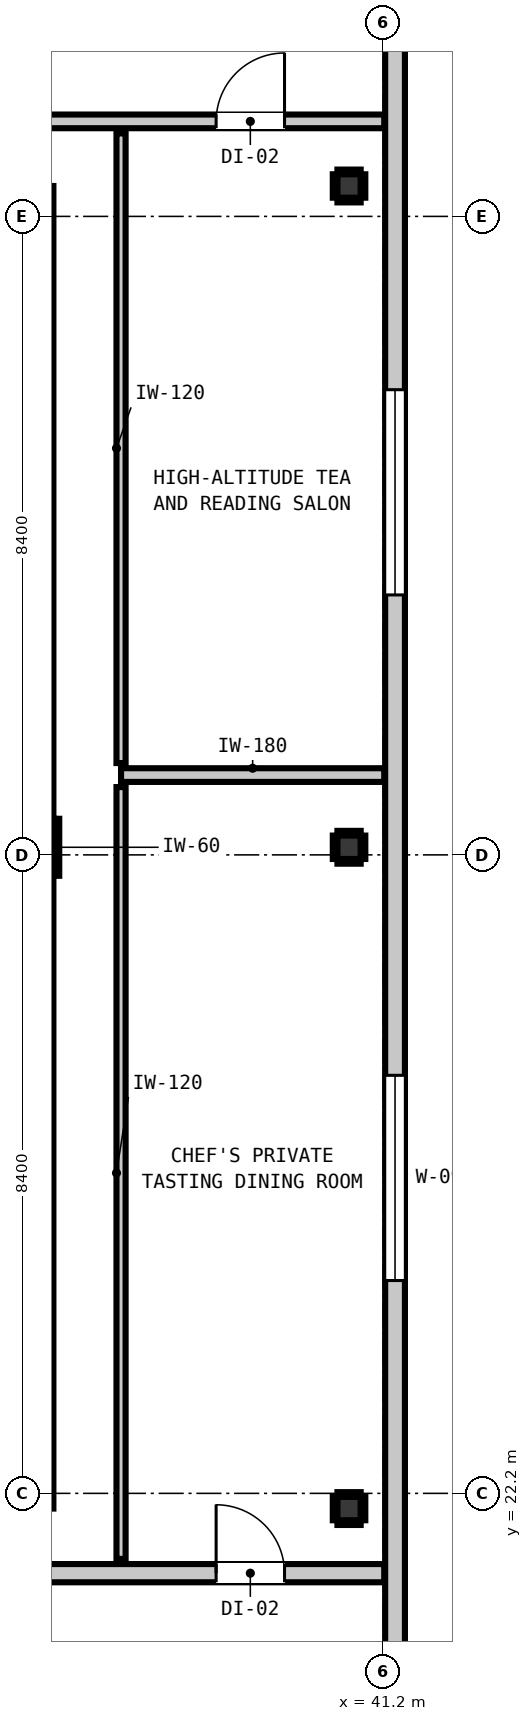
"""IFC4 building model, lengths in metres.
Left out: names, types, materials, properties, quantities, classifications, styles, units other than length and angle.
Written with IfcOpenShell. Run it as: python <this file> out.ifc"""

import sys

from ifc_helpers import new_model, si_unit, direction, frame, frame_2d, origin, origin_2d, place, context, subcontext, project, spatial, rectangle, i_section, extrude, element, fill, save


model = new_model("IFC4")
c1 = context("Model", 3, precision=1e-05, world=origin(), true_north=direction((0.0, 1.0)))
c2 = subcontext(c1, "Body", "Model", "MODEL_VIEW")
j1 = project(units=[si_unit("LENGTHUNIT", "METRE"), si_unit("PLANEANGLEUNIT", "RADIAN")], contexts=[c1])
p1 = place(None, origin())
s1 = spatial("IfcSite", under=j1, at=p1, CompositionType="ELEMENT")
p2 = place(p1, origin())
s2 = spatial("IfcBuilding", under=s1, at=p2, CompositionType="ELEMENT")
p3 = place(p2, frame((0.0, 0.0, 273.48)))
s3 = spatial("IfcBuildingStorey", under=s2, at=p3, CompositionType="ELEMENT", Elevation=273.48)
p4 = place(p3, frame((36.5, 30.7, 0.0), z_axis=(0.0, 0.0, 1.0), x_axis=(1.0, 0.0, 0.0)))
e1 = element("IfcColumn", 1, at=p4, inside=s3, PredefinedType="COLUMN", context=c2, shape_type="SweptSolid", body=[
    extrude(rectangle(XDim=0.75, YDim=0.75, at=origin_2d()), origin(), (0.0, 0.0, 1.0), 4.6),
])
p5 = place(p3, frame((36.46, 22.0, 0.0), z_axis=(0.0, 0.0, 1.0), x_axis=(0.0, 1.0, 0.0)))
e2 = element("IfcWall", 2, at=p5, inside=s3, PredefinedType="SHEAR", context=c2, shape_type="SweptSolid", body=[
    extrude(rectangle(XDim=8.32, YDim=0.8, at=frame_2d((4.16, 0.0))), origin(), (0.0, 0.0, 1.0), 4.6),
])
p6 = place(p3, frame((36.46, 31.08, 0.0), z_axis=(0.0, 0.0, 1.0), x_axis=(0.0, 1.0, 0.0)))
e3 = element("IfcWall", 3, at=p6, inside=s3, PredefinedType="SHEAR", context=c2, shape_type="SweptSolid", body=[
    extrude(rectangle(XDim=8.32, YDim=0.8, at=frame_2d((4.16, 0.0))), origin(), (0.0, 0.0, 1.0), 4.6),
])
for number, where, z_axis, x_axis in (
    (4, (40.75, 22.0, 0.0), (0.0, 0.0, 1.0), (1.0, 0.0, 0.0)),
    (5, (40.75, 30.7, 0.0), (0.0, 0.0, 1.0), (1.0, 0.0, 0.0)),
    (6, (40.75, 39.4, 0.0), (0.0, 0.0, 1.0), (1.0, 0.0, 0.0)),
):
    element("IfcColumn", number, at=place(p3, frame(where, z_axis=z_axis, x_axis=x_axis)), inside=s3, PredefinedType="COLUMN", context=c2, shape_type="SweptSolid", body=[
        extrude(i_section(OverallWidth=0.305, OverallDepth=0.308, WebThickness=0.01, FlangeThickness=0.015, at=origin_2d()), origin(), (0.0, 0.0, 1.0), 4.18),
    ])
p7 = place(p3, frame((41.355, 48.855, 0.0), z_axis=(0.0, 0.0, 1.0), x_axis=(0.0, -1.0, 0.0)))
e7 = element("IfcWall", 7, at=p7, inside=s3, PredefinedType="STANDARD", context=c2, shape_type="SweptSolid", body=[
    extrude(rectangle(XDim=30.31, YDim=0.26, at=frame_2d((15.155, 0.0))), origin(), (0.0, 0.0, 1.0), 4.18),
])
p8 = place(p7, frame((21.155, 0.0, 0.85)))
e8 = element("IfcOpeningElement", 8, at=p8, cuts=e7, PredefinedType="OPENING", context=c2, shape_type="SweptSolid", body=[
    extrude(rectangle(XDim=2.7, YDim=2.0, at=frame_2d((1.35, 1.0))), frame((0.0, 0.14, 0.0), z_axis=(0.0, -1.0, 0.0), x_axis=(1.0, 0.0, 0.0)), (0.0, 0.0, 1.0), 0.28),
])
p9 = place(p7, frame((12.135, 0.0, 0.85)))
e9 = element("IfcOpeningElement", 9, at=p9, cuts=e7, PredefinedType="OPENING", context=c2, shape_type="SweptSolid", body=[
    extrude(rectangle(XDim=2.7, YDim=2.0, at=frame_2d((1.35, 1.0))), frame((0.0, 0.14, 0.0), z_axis=(0.0, -1.0, 0.0), x_axis=(1.0, 0.0, 0.0)), (0.0, 0.0, 1.0), 0.28),
])
p10 = place(p3, frame((4.587, 21.15, 0.0), z_axis=(0.0, 0.0, 1.0), x_axis=(1.0, 0.0, 0.0)))
e10 = element("IfcWall", 10, at=p10, inside=s3, PredefinedType="PARTITIONING", context=c2, shape_type="SweptSolid", body=[
    extrude(rectangle(XDim=36.626, YDim=0.24, at=frame_2d((18.313, 0.0))), origin(), (0.0, 0.0, 1.0), 4.18),
])
p11 = place(p10, frame((13.623, 0.0, 0.0)))
e11 = element("IfcOpeningElement", 11, at=p11, cuts=e10, PredefinedType="OPENING", context=c2, shape_type="SweptSolid", body=[
    extrude(rectangle(XDim=1.1, YDim=2.15, at=frame_2d((0.55, 1.075))), frame((0.0, 0.13, 0.0), z_axis=(0.0, -1.0, 0.0), x_axis=(1.0, 0.0, 0.0)), (0.0, 0.0, 1.0), 0.26),
])
p12 = place(p10, frame((5.863, 0.0, 0.0)))
e12 = element("IfcOpeningElement", 12, at=p12, cuts=e10, PredefinedType="OPENING", context=c2, shape_type="SweptSolid", body=[
    extrude(rectangle(XDim=1.4, YDim=2.15, at=frame_2d((0.7, 1.075))), frame((0.0, 0.13, 0.0), z_axis=(0.0, -1.0, 0.0), x_axis=(1.0, 0.0, 0.0)), (0.0, 0.0, 1.0), 0.26),
])
p13 = place(p10, frame((2.382, 0.0, 0.0)))
e13 = element("IfcOpeningElement", 13, at=p13, cuts=e10, PredefinedType="OPENING", context=c2, shape_type="SweptSolid", body=[
    extrude(rectangle(XDim=0.86, YDim=2.02, at=frame_2d((0.43, 1.01))), frame((0.0, 0.13, 0.0), z_axis=(0.0, -1.0, 0.0), x_axis=(1.0, 0.0, 0.0)), (0.0, 0.0, 1.0), 0.26),
])
p14 = place(p10, frame((34.414, 0.0, 0.0)))
e14 = element("IfcOpeningElement", 14, at=p14, cuts=e10, PredefinedType="OPENING", context=c2, shape_type="SweptSolid", body=[
    extrude(rectangle(XDim=0.9, YDim=2.1, at=frame_2d((0.45, 1.05))), frame((0.0, 0.13, 0.0), z_axis=(0.0, -1.0, 0.0), x_axis=(1.0, 0.0, 0.0)), (0.0, 0.0, 1.0), 0.26),
])
p15 = place(p3, frame((37.75, 31.65, 0.0), z_axis=(0.0, 0.0, 1.0), x_axis=(1.0, 0.0, 0.0)))
e15 = element("IfcWall", 15, at=p15, inside=s3, PredefinedType="PARTITIONING", context=c2, shape_type="SweptSolid", body=[
    extrude(rectangle(XDim=3.463, YDim=0.18, at=frame_2d((1.731, 0.0))), origin(), (0.0, 0.0, 1.0), 4.18),
])
p16 = place(p3, frame((4.587, 40.25, 0.0), z_axis=(0.0, 0.0, 1.0), x_axis=(1.0, 0.0, 0.0)))
e16 = element("IfcWall", 16, at=p16, inside=s3, PredefinedType="PARTITIONING", context=c2, shape_type="SweptSolid", body=[
    extrude(rectangle(XDim=36.626, YDim=0.18, at=frame_2d((18.313, 0.0))), origin(), (0.0, 0.0, 1.0), 4.18),
])
p17 = place(p16, frame((12.848, 0.0, 0.0)))
e17 = element("IfcOpeningElement", 17, at=p17, cuts=e16, PredefinedType="OPENING", context=c2, shape_type="SweptSolid", body=[
    extrude(rectangle(XDim=1.4, YDim=2.15, at=frame_2d((0.7, 1.075))), frame((0.0, 0.1, 0.0), z_axis=(0.0, -1.0, 0.0), x_axis=(1.0, 0.0, 0.0)), (0.0, 0.0, 1.0), 0.2),
])
p18 = place(p16, frame((5.863, 0.0, 0.0)))
e18 = element("IfcOpeningElement", 18, at=p18, cuts=e16, PredefinedType="OPENING", context=c2, shape_type="SweptSolid", body=[
    extrude(rectangle(XDim=1.4, YDim=2.15, at=frame_2d((0.7, 1.075))), frame((0.0, 0.1, 0.0), z_axis=(0.0, -1.0, 0.0), x_axis=(1.0, 0.0, 0.0)), (0.0, 0.0, 1.0), 0.2),
])
p19 = place(p16, frame((2.362, 0.0, 0.0)))
e19 = element("IfcOpeningElement", 19, at=p19, cuts=e16, PredefinedType="OPENING", context=c2, shape_type="SweptSolid", body=[
    extrude(rectangle(XDim=0.9, YDim=2.1, at=frame_2d((0.45, 1.05))), frame((0.0, 0.1, 0.0), z_axis=(0.0, -1.0, 0.0), x_axis=(1.0, 0.0, 0.0)), (0.0, 0.0, 1.0), 0.2),
])
p20 = place(p16, frame((34.414, 0.0, 0.0)))
e20 = element("IfcOpeningElement", 20, at=p20, cuts=e16, PredefinedType="OPENING", context=c2, shape_type="SweptSolid", body=[
    extrude(rectangle(XDim=0.9, YDim=2.1, at=frame_2d((0.45, 1.05))), frame((0.0, 0.1, 0.0), z_axis=(0.0, -1.0, 0.0), x_axis=(1.0, 0.0, 0.0)), (0.0, 0.0, 1.0), 0.2),
])
p21 = place(p3, frame((37.75, 21.338, 0.0), z_axis=(0.0, 0.0, 1.0), x_axis=(0.0, 1.0, 0.0)))
e21 = element("IfcWall", 21, at=p21, inside=s3, PredefinedType="PARTITIONING", context=c2, shape_type="SweptSolid", body=[
    extrude(rectangle(XDim=10.154, YDim=0.12, at=frame_2d((5.077, 0.0))), origin(), (0.0, 0.0, 1.0), 4.18),
])
p22 = place(p3, frame((37.75, 31.808, 0.0), z_axis=(0.0, 0.0, 1.0), x_axis=(0.0, 1.0, 0.0)))
e22 = element("IfcWall", 22, at=p22, inside=s3, PredefinedType="PARTITIONING", context=c2, shape_type="SweptSolid", body=[
    extrude(rectangle(XDim=8.284, YDim=0.12, at=frame_2d((4.142, 0.0))), origin(), (0.0, 0.0, 1.0), 4.18),
])
p23 = place(p3, frame((36.907, 30.325, 0.0), z_axis=(0.0, 0.0, 1.0), x_axis=(0.0, 1.0, 0.0)))
e23 = element("IfcWall", 23, at=p23, inside=s3, PredefinedType="PARTITIONING", context=c2, shape_type="SweptSolid", body=[
    extrude(rectangle(XDim=0.75, YDim=0.06, at=frame_2d((0.375, 0.0))), origin(), (0.0, 0.0, 1.0), 1.45),
])
for number, where, z_axis, x_axis in (
    (24, (40.597, 21.814, 0.0), (0.0, 0.0, 1.0), (1.0, 0.0, 0.0)),
    (25, (40.597, 22.186, 0.0), (0.0, 0.0, 1.0), (1.0, 0.0, 0.0)),
):
    element("IfcWall", number, at=place(p3, frame(where, z_axis=z_axis, x_axis=x_axis)), inside=s3, PredefinedType="PARTITIONING", context=c2, shape_type="SweptSolid", body=[
        extrude(rectangle(XDim=0.306, YDim=0.06, at=frame_2d((0.153, 0.0))), origin(), (0.0, 0.0, 1.0), 1.45),
    ])
for number, where, z_axis, x_axis in (
    (26, (40.566, 21.846, 0.0), (0.0, 0.0, 1.0), (0.0, 1.0, 0.0)),
    (27, (40.934, 21.846, 0.0), (0.0, 0.0, 1.0), (0.0, 1.0, 0.0)),
):
    element("IfcWall", number, at=place(p3, frame(where, z_axis=z_axis, x_axis=x_axis)), inside=s3, PredefinedType="PARTITIONING", context=c2, shape_type="SweptSolid", body=[
        extrude(rectangle(XDim=0.308, YDim=0.06, at=frame_2d((0.154, 0.0))), origin(), (0.0, 0.0, 1.0), 1.45),
    ])
for number, where, z_axis, x_axis in (
    (28, (40.597, 30.514, 0.0), (0.0, 0.0, 1.0), (1.0, 0.0, 0.0)),
    (29, (40.597, 30.886, 0.0), (0.0, 0.0, 1.0), (1.0, 0.0, 0.0)),
):
    element("IfcWall", number, at=place(p3, frame(where, z_axis=z_axis, x_axis=x_axis)), inside=s3, PredefinedType="PARTITIONING", context=c2, shape_type="SweptSolid", body=[
        extrude(rectangle(XDim=0.306, YDim=0.06, at=frame_2d((0.153, 0.0))), origin(), (0.0, 0.0, 1.0), 1.45),
    ])
for number, where, z_axis, x_axis in (
    (30, (40.566, 30.546, 0.0), (0.0, 0.0, 1.0), (0.0, 1.0, 0.0)),
    (31, (40.934, 30.546, 0.0), (0.0, 0.0, 1.0), (0.0, 1.0, 0.0)),
):
    element("IfcWall", number, at=place(p3, frame(where, z_axis=z_axis, x_axis=x_axis)), inside=s3, PredefinedType="PARTITIONING", context=c2, shape_type="SweptSolid", body=[
        extrude(rectangle(XDim=0.308, YDim=0.06, at=frame_2d((0.154, 0.0))), origin(), (0.0, 0.0, 1.0), 1.45),
    ])
for number, where, z_axis, x_axis in (
    (32, (40.597, 39.214, 0.0), (0.0, 0.0, 1.0), (1.0, 0.0, 0.0)),
    (33, (40.597, 39.586, 0.0), (0.0, 0.0, 1.0), (1.0, 0.0, 0.0)),
):
    element("IfcWall", number, at=place(p3, frame(where, z_axis=z_axis, x_axis=x_axis)), inside=s3, PredefinedType="PARTITIONING", context=c2, shape_type="SweptSolid", body=[
        extrude(rectangle(XDim=0.306, YDim=0.06, at=frame_2d((0.153, 0.0))), origin(), (0.0, 0.0, 1.0), 1.45),
    ])
for number, where, z_axis, x_axis in (
    (34, (40.566, 39.246, 0.0), (0.0, 0.0, 1.0), (0.0, 1.0, 0.0)),
    (35, (40.934, 39.246, 0.0), (0.0, 0.0, 1.0), (0.0, 1.0, 0.0)),
):
    element("IfcWall", number, at=place(p3, frame(where, z_axis=z_axis, x_axis=x_axis)), inside=s3, PredefinedType="PARTITIONING", context=c2, shape_type="SweptSolid", body=[
        extrude(rectangle(XDim=0.308, YDim=0.06, at=frame_2d((0.154, 0.0))), origin(), (0.0, 0.0, 1.0), 1.45),
    ])
p24 = place(p8, origin())
e36 = element("IfcWindow", 36, at=p24, inside=s3, PartitioningType="SINGLE_PANEL", PredefinedType="WINDOW", context=c2, shape_type="SweptSolid", body=[
    extrude(rectangle(XDim=2.7, YDim=2.0, at=frame_2d((1.35, 1.0))), frame((0.0, 0.03, 0.0), z_axis=(0.0, -1.0, 0.0), x_axis=(1.0, 0.0, 0.0)), (0.0, 0.0, 1.0), 0.06),
])
fill(e8, e36)
p25 = place(p9, origin())
e37 = element("IfcWindow", 37, at=p25, inside=s3, PartitioningType="SINGLE_PANEL", PredefinedType="WINDOW", context=c2, shape_type="SweptSolid", body=[
    extrude(rectangle(XDim=2.7, YDim=2.0, at=frame_2d((1.35, 1.0))), frame((0.0, 0.03, 0.0), z_axis=(0.0, -1.0, 0.0), x_axis=(1.0, 0.0, 0.0)), (0.0, 0.0, 1.0), 0.06),
])
fill(e9, e37)
p26 = place(p14, origin())
e38 = element("IfcDoor", 38, at=p26, inside=s3, OperationType="SINGLE_SWING_LEFT", PredefinedType="DOOR", context=c2, shape_type="SweptSolid", body=[
    extrude(rectangle(XDim=0.9, YDim=2.1, at=frame_2d((0.45, 1.05))), frame((0.0, 0.025, 0.0), z_axis=(0.0, -1.0, 0.0), x_axis=(1.0, 0.0, 0.0)), (0.0, 0.0, 1.0), 0.05),
])
fill(e14, e38)
p27 = place(p20, origin())
e39 = element("IfcDoor", 39, at=p27, inside=s3, OperationType="SINGLE_SWING_RIGHT", PredefinedType="DOOR", context=c2, shape_type="SweptSolid", body=[
    extrude(rectangle(XDim=0.9, YDim=2.1, at=frame_2d((0.45, 1.05))), frame((0.0, 0.025, 0.0), z_axis=(0.0, -1.0, 0.0), x_axis=(1.0, 0.0, 0.0)), (0.0, 0.0, 1.0), 0.05),
])
fill(e20, e39)
save(model, sys.argv[1])
